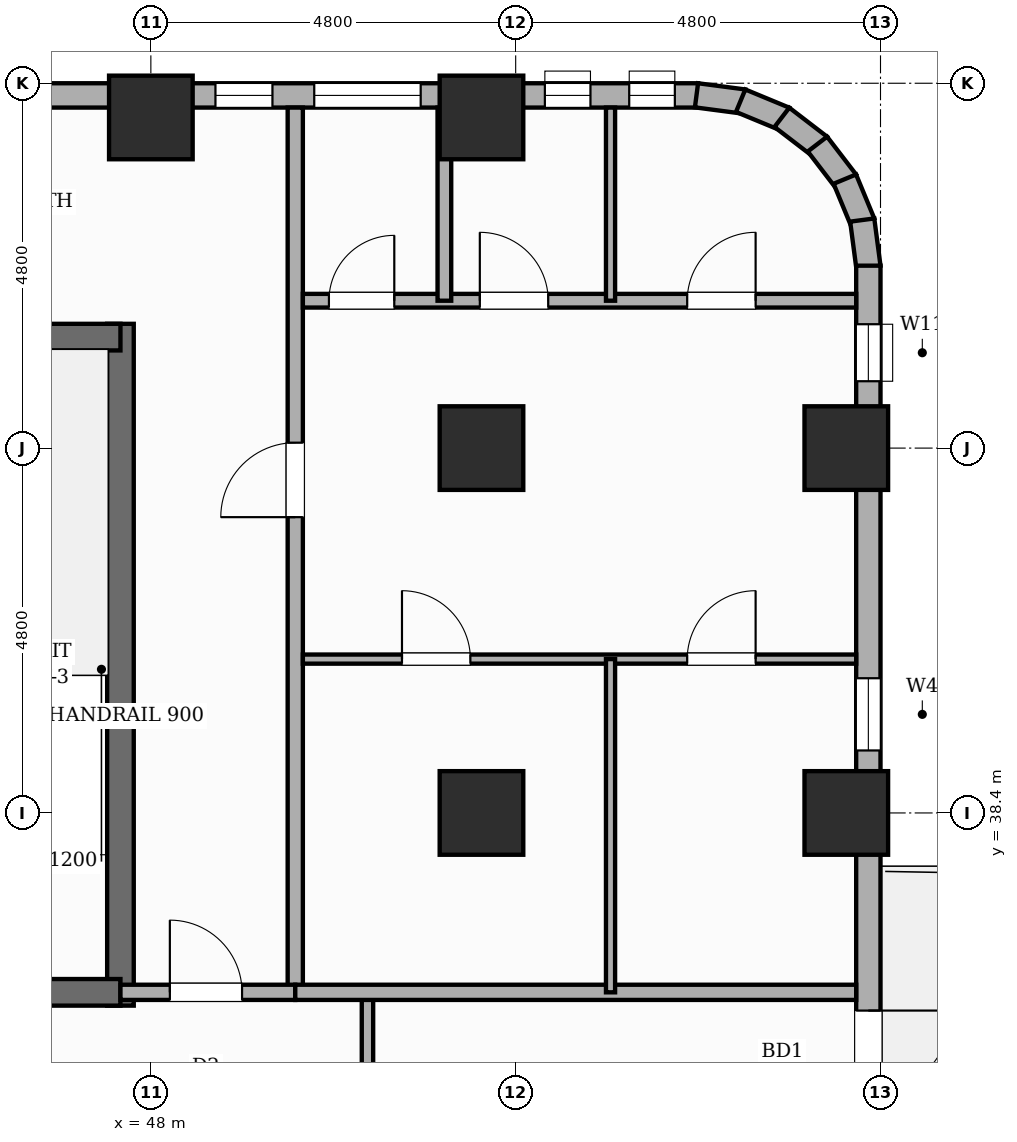
"""IFC4 building model, lengths in metres.
Left out: names, types, materials, properties, quantities, classifications, styles, units other than length and angle.
Written with IfcOpenShell. Run it as: python <this file> out.ifc"""

import sys

from ifc_helpers import new_model, si_unit, direction, frame, frame_2d, origin, origin_2d, place, context, subcontext, project, spatial, rectangle, extrude, element, fill, save


model = new_model("IFC4")
c1 = context("Model", 3, precision=1e-05, world=origin(), true_north=direction((0.0, 1.0)))
c2 = subcontext(c1, "Body", "Model", "MODEL_VIEW")
j1 = project(units=[si_unit("LENGTHUNIT", "METRE"), si_unit("PLANEANGLEUNIT", "RADIAN")], contexts=[c1])
p1 = place(None, origin())
s1 = spatial("IfcSite", under=j1, at=p1, CompositionType="ELEMENT")
p2 = place(p1, origin())
s2 = spatial("IfcBuilding", under=s1, at=p2, CompositionType="ELEMENT")
p3 = place(p2, frame((0.0, 0.0, 28.6)))
s3 = spatial("IfcBuildingStorey", under=s2, at=p3, CompositionType="ELEMENT", Elevation=28.6)
p4 = place(p3, frame((47.6, 35.865, 0.0), z_axis=(0.0, 0.0, 1.0), x_axis=(0.0, 1.0, 0.0)))
e1 = element("IfcWall", 1, at=p4, inside=s3, PredefinedType="SHEAR", context=c2, shape_type="SweptSolid", body=[
    extrude(rectangle(XDim=8.97, YDim=0.35, at=frame_2d((4.485, 0.0))), origin(), (0.0, 0.0, 1.0), 3.6),
])
for number, where, z_axis, x_axis in (
    (2, (44.02, 36.04, 0.0), (0.0, 0.0, 1.0), (1.0, 0.0, 0.0)),
    (3, (44.02, 44.66, 0.0), (0.0, 0.0, 1.0), (1.0, 0.0, 0.0)),
):
    element("IfcWall", number, at=place(p3, frame(where, z_axis=z_axis, x_axis=x_axis)), inside=s3, PredefinedType="SHEAR", context=c2, shape_type="SweptSolid", body=[
        extrude(rectangle(XDim=3.58, YDim=0.35, at=frame_2d((1.79, 0.0))), origin(), (0.0, 0.0, 1.0), 3.6),
    ])
for number, where, z_axis, x_axis in (
    (4, (48.0, 47.55, 0.0), (0.0, 0.0, 1.0), (1.0, 0.0, 0.0)),
    (5, (52.35, 38.4, 0.0), (0.0, 0.0, 1.0), (1.0, 0.0, 0.0)),
    (6, (52.35, 43.2, 0.0), (0.0, 0.0, 1.0), (1.0, 0.0, 0.0)),
    (7, (52.35, 47.55, 0.0), (0.0, 0.0, 1.0), (1.0, 0.0, 0.0)),
    (8, (57.15, 38.4, 0.0), (0.0, 0.0, 1.0), (1.0, 0.0, 0.0)),
    (9, (57.15, 43.2, 0.0), (0.0, 0.0, 1.0), (1.0, 0.0, 0.0)),
):
    element("IfcColumn", number, at=place(p3, frame(where, z_axis=z_axis, x_axis=x_axis)), inside=s3, PredefinedType="COLUMN", context=c2, shape_type="SweptSolid", body=[
        extrude(rectangle(XDim=1.1, YDim=1.1, at=origin_2d()), origin(), (0.0, 0.0, 1.0), 3.6),
    ])
p5 = place(p3, frame((7.2, 47.84, 0.0), z_axis=(0.0, 0.0, 1.0), x_axis=(1.0, 0.0, 0.0)))
e10 = element("IfcWall", 10, at=p5, inside=s3, PredefinedType="STANDARD", context=c2, shape_type="SweptSolid", body=[
    extrude(rectangle(XDim=48.0, YDim=0.32, at=frame_2d((24.0, 0.0))), origin(), (0.0, 0.0, 1.0), 2.53),
])
p6 = place(p5, frame((24.97, 0.0, 0.45)))
e11 = element("IfcOpeningElement", 11, at=p6, cuts=e10, PredefinedType="OPENING", context=c2, shape_type="SweptSolid", body=[
    extrude(rectangle(XDim=0.6, YDim=1.8, at=frame_2d((0.3, 0.9))), frame((0.0, 0.17, 0.0), z_axis=(0.0, -1.0, 0.0), x_axis=(1.0, 0.0, 0.0)), (0.0, 0.0, 1.0), 0.34),
])
p7 = place(p5, frame((32.435, 0.0, 0.65)))
e12 = element("IfcOpeningElement", 12, at=p7, cuts=e10, PredefinedType="OPENING", context=c2, shape_type="SweptSolid", body=[
    extrude(rectangle(XDim=1.4, YDim=1.1, at=frame_2d((0.7, 0.55))), frame((0.0, 0.17, 0.0), z_axis=(0.0, -1.0, 0.0), x_axis=(1.0, 0.0, 0.0)), (0.0, 0.0, 1.0), 0.34),
])
p8 = place(p5, frame((47.094, 0.0, 0.45)))
e13 = element("IfcOpeningElement", 13, at=p8, cuts=e10, PredefinedType="OPENING", context=c2, shape_type="SweptSolid", body=[
    extrude(rectangle(XDim=0.6, YDim=1.8, at=frame_2d((0.3, 0.9))), frame((0.0, 0.17, 0.0), z_axis=(0.0, -1.0, 0.0), x_axis=(1.0, 0.0, 0.0)), (0.0, 0.0, 1.0), 0.34),
])
p9 = place(p5, frame((18.74, 0.0, 0.45)))
e14 = element("IfcOpeningElement", 14, at=p9, cuts=e10, PredefinedType="OPENING", context=c2, shape_type="SweptSolid", body=[
    extrude(rectangle(XDim=0.95, YDim=1.8, at=frame_2d((0.475, 0.9))), frame((0.0, 0.17, 0.0), z_axis=(0.0, -1.0, 0.0), x_axis=(1.0, 0.0, 0.0)), (0.0, 0.0, 1.0), 0.34),
])
p10 = place(p5, frame((41.65, 0.0, 0.45)))
e15 = element("IfcOpeningElement", 15, at=p10, cuts=e10, PredefinedType="OPENING", context=c2, shape_type="SweptSolid", body=[
    extrude(rectangle(XDim=0.75, YDim=1.8, at=frame_2d((0.375, 0.9))), frame((0.0, 0.17, 0.0), z_axis=(0.0, -1.0, 0.0), x_axis=(1.0, 0.0, 0.0)), (0.0, 0.0, 1.0), 0.34),
])
p11 = place(p5, frame((37.736, 0.0, 0.65)))
e16 = element("IfcOpeningElement", 16, at=p11, cuts=e10, PredefinedType="OPENING", context=c2, shape_type="SweptSolid", body=[
    extrude(rectangle(XDim=1.4, YDim=1.1, at=frame_2d((0.7, 0.55))), frame((0.0, 0.17, 0.0), z_axis=(0.0, -1.0, 0.0), x_axis=(1.0, 0.0, 0.0)), (0.0, 0.0, 1.0), 0.34),
])
p12 = place(p5, frame((0.47, 0.0, 0.45)))
e17 = element("IfcOpeningElement", 17, at=p12, cuts=e10, PredefinedType="OPENING", context=c2, shape_type="SweptSolid", body=[
    extrude(rectangle(XDim=0.95, YDim=1.8, at=frame_2d((0.475, 0.9))), frame((0.0, 0.17, 0.0), z_axis=(0.0, -1.0, 0.0), x_axis=(1.0, 0.0, 0.0)), (0.0, 0.0, 1.0), 0.34),
])
p13 = place(p5, frame((4.815, 0.0, 0.65)))
e18 = element("IfcOpeningElement", 18, at=p13, cuts=e10, PredefinedType="OPENING", context=c2, shape_type="SweptSolid", body=[
    extrude(rectangle(XDim=1.4, YDim=1.1, at=frame_2d((0.7, 0.55))), frame((0.0, 0.17, 0.0), z_axis=(0.0, -1.0, 0.0), x_axis=(1.0, 0.0, 0.0)), (0.0, 0.0, 1.0), 0.34),
])
p14 = place(p5, frame((22.87, 0.0, 0.65)))
e19 = element("IfcOpeningElement", 19, at=p14, cuts=e10, PredefinedType="OPENING", context=c2, shape_type="SweptSolid", body=[
    extrude(rectangle(XDim=1.4, YDim=1.1, at=frame_2d((0.7, 0.55))), frame((0.0, 0.17, 0.0), z_axis=(0.0, -1.0, 0.0), x_axis=(1.0, 0.0, 0.0)), (0.0, 0.0, 1.0), 0.34),
])
p15 = place(p5, frame((28.03, 0.0, 0.65)))
e20 = element("IfcOpeningElement", 20, at=p15, cuts=e10, PredefinedType="OPENING", context=c2, shape_type="SweptSolid", body=[
    extrude(rectangle(XDim=1.4, YDim=1.1, at=frame_2d((0.7, 0.55))), frame((0.0, 0.17, 0.0), z_axis=(0.0, -1.0, 0.0), x_axis=(1.0, 0.0, 0.0)), (0.0, 0.0, 1.0), 0.34),
])
p16 = place(p5, frame((42.95, 0.0, 0.65)))
e21 = element("IfcOpeningElement", 21, at=p16, cuts=e10, PredefinedType="OPENING", context=c2, shape_type="SweptSolid", body=[
    extrude(rectangle(XDim=1.4, YDim=1.1, at=frame_2d((0.7, 0.55))), frame((0.0, 0.17, 0.0), z_axis=(0.0, -1.0, 0.0), x_axis=(1.0, 0.0, 0.0)), (0.0, 0.0, 1.0), 0.34),
])
p17 = place(p5, frame((45.984, 0.0, 0.45)))
e22 = element("IfcOpeningElement", 22, at=p17, cuts=e10, PredefinedType="OPENING", context=c2, shape_type="SweptSolid", body=[
    extrude(rectangle(XDim=0.6, YDim=1.8, at=frame_2d((0.3, 0.9))), frame((0.0, 0.17, 0.0), z_axis=(0.0, -1.0, 0.0), x_axis=(1.0, 0.0, 0.0)), (0.0, 0.0, 1.0), 0.34),
])
for number, where, z_axis, x_axis in (
    (23, (55.179, 47.841, 0.0), (0.0, 0.0, 1.0), (0.991, -0.131, 0.0)),
    (24, (55.76, 47.771, 0.0), (0.0, 0.0, 1.0), (0.924, -0.383, 0.0)),
):
    element("IfcWall", number, at=place(p3, frame(where, z_axis=z_axis, x_axis=x_axis)), inside=s3, PredefinedType="STANDARD", context=c2, shape_type="SweptSolid", body=[
        extrude(rectangle(XDim=0.626, YDim=0.32, at=frame_2d((0.313, 0.0))), origin(), (0.0, 0.0, 1.0), 3.35),
    ])
p18 = place(p3, frame((56.302, 47.552, 0.0), z_axis=(0.0, 0.0, 1.0), x_axis=(0.793549926411, -0.608505147302, 0.0)))
e25 = element("IfcWall", 25, at=p18, inside=s3, PredefinedType="STANDARD", context=c2, shape_type="SweptSolid", body=[
    extrude(rectangle(XDim=0.627, YDim=0.32, at=frame_2d((0.313, 0.0))), origin(), (0.0, 0.0, 1.0), 3.35),
])
for number, where, z_axis, x_axis in (
    (26, (56.77, 47.2, 0.0), (0.0, 0.0, 1.0), (0.609, -0.793, 0.0)),
    (27, (57.131, 46.739, 0.0), (0.0, 0.0, 1.0), (0.383, -0.924, 0.0)),
    (28, (57.36, 46.2, 0.0), (0.0, 0.0, 1.0), (0.131, -0.991, 0.0)),
):
    element("IfcWall", number, at=place(p3, frame(where, z_axis=z_axis, x_axis=x_axis)), inside=s3, PredefinedType="STANDARD", context=c2, shape_type="SweptSolid", body=[
        extrude(rectangle(XDim=0.626, YDim=0.32, at=frame_2d((0.313, 0.0))), origin(), (0.0, 0.0, 1.0), 3.35),
    ])
p19 = place(p3, frame((57.44, 45.6, 0.0), z_axis=(0.0, 0.0, 1.0), x_axis=(0.0, -1.0, 0.0)))
e29 = element("IfcWall", 29, at=p19, inside=s3, PredefinedType="STANDARD", context=c2, shape_type="SweptSolid", body=[
    extrude(rectangle(XDim=14.4, YDim=0.32, at=frame_2d((7.2, 0.0))), origin(), (0.0, 0.0, 1.0), 2.53),
])
p20 = place(p19, frame((9.8, 0.0, 0.0)))
e30 = element("IfcOpeningElement", 30, at=p20, cuts=e29, PredefinedType="OPENING", context=c2, shape_type="SweptSolid", body=[
    extrude(rectangle(XDim=1.1, YDim=2.15, at=frame_2d((0.55, 1.075))), frame((0.0, 0.17, 0.0), z_axis=(0.0, -1.0, 0.0), x_axis=(1.0, 0.0, 0.0)), (0.0, 0.0, 1.0), 0.34),
])
p21 = place(p19, frame((5.428, 0.0, 0.45)))
e31 = element("IfcOpeningElement", 31, at=p21, cuts=e29, PredefinedType="OPENING", context=c2, shape_type="SweptSolid", body=[
    extrude(rectangle(XDim=0.95, YDim=1.8, at=frame_2d((0.475, 0.9))), frame((0.0, 0.17, 0.0), z_axis=(0.0, -1.0, 0.0), x_axis=(1.0, 0.0, 0.0)), (0.0, 0.0, 1.0), 0.34),
])
p22 = place(p19, frame((12.98, 0.0, 0.45)))
e32 = element("IfcOpeningElement", 32, at=p22, cuts=e29, PredefinedType="OPENING", context=c2, shape_type="SweptSolid", body=[
    extrude(rectangle(XDim=0.95, YDim=1.8, at=frame_2d((0.475, 0.9))), frame((0.0, 0.17, 0.0), z_axis=(0.0, -1.0, 0.0), x_axis=(1.0, 0.0, 0.0)), (0.0, 0.0, 1.0), 0.34),
])
p23 = place(p19, frame((0.771, 0.0, 0.45)))
e33 = element("IfcOpeningElement", 33, at=p23, cuts=e29, PredefinedType="OPENING", context=c2, shape_type="SweptSolid", body=[
    extrude(rectangle(XDim=0.75, YDim=1.8, at=frame_2d((0.375, 0.9))), frame((0.0, 0.17, 0.0), z_axis=(0.0, -1.0, 0.0), x_axis=(1.0, 0.0, 0.0)), (0.0, 0.0, 1.0), 0.34),
])
p24 = place(p3, frame((49.9, 36.04, 0.0), z_axis=(0.0, 0.0, 1.0), x_axis=(0.0, 1.0, 0.0)))
e34 = element("IfcWall", 34, at=p24, inside=s3, PredefinedType="PARTITIONING", context=c2, shape_type="SweptSolid", body=[
    extrude(rectangle(XDim=11.64, YDim=0.2, at=frame_2d((5.82, 0.0))), origin(), (0.0, 0.0, 1.0), 3.35),
])
p25 = place(p24, frame((6.251, 0.0, 0.0)))
e35 = element("IfcOpeningElement", 35, at=p25, cuts=e34, PredefinedType="OPENING", context=c2, shape_type="SweptSolid", body=[
    extrude(rectangle(XDim=0.98, YDim=2.18, at=frame_2d((0.49, 1.09))), frame((0.0, 0.11, 0.0), z_axis=(0.0, -1.0, 0.0), x_axis=(1.0, 0.0, 0.0)), (0.0, 0.0, 1.0), 0.22),
])
p26 = place(p3, frame((47.6, 36.04, 0.0), z_axis=(0.0, 0.0, 1.0), x_axis=(1.0, 0.0, 0.0)))
e36 = element("IfcWall", 36, at=p26, inside=s3, PredefinedType="PARTITIONING", context=c2, shape_type="SweptSolid", body=[
    extrude(rectangle(XDim=2.3, YDim=0.2, at=frame_2d((1.15, 0.0))), origin(), (0.0, 0.0, 1.0), 3.35),
])
p27 = place(p26, frame((0.65, 0.0, 0.0)))
e37 = element("IfcOpeningElement", 37, at=p27, cuts=e36, PredefinedType="OPENING", context=c2, shape_type="SweptSolid", body=[
    extrude(rectangle(XDim=0.95, YDim=2.15, at=frame_2d((0.475, 1.075))), frame((0.0, 0.11, 0.0), z_axis=(0.0, -1.0, 0.0), x_axis=(1.0, 0.0, 0.0)), (0.0, 0.0, 1.0), 0.22),
])
p28 = place(p3, frame((50.85, 29.12, 0.0), z_axis=(0.0, 0.0, 1.0), x_axis=(0.0, 1.0, 0.0)))
e38 = element("IfcWall", 38, at=p28, inside=s3, PredefinedType="PARTITIONING", context=c2, shape_type="SweptSolid", body=[
    extrude(rectangle(XDim=6.92, YDim=0.15, at=frame_2d((3.46, 0.0))), origin(), (0.0, 0.0, 1.0), 3.35),
])
p29 = place(p28, frame((2.24, 0.0, 0.0)))
e39 = element("IfcOpeningElement", 39, at=p29, cuts=e38, PredefinedType="OPENING", context=c2, shape_type="SweptSolid", body=[
    extrude(rectangle(XDim=0.9, YDim=2.15, at=frame_2d((0.45, 1.075))), frame((0.0, 0.085, 0.0), z_axis=(0.0, -1.0, 0.0), x_axis=(1.0, 0.0, 0.0)), (0.0, 0.0, 1.0), 0.17),
])
p30 = place(p3, frame((49.9, 36.04, 0.0), z_axis=(0.0, 0.0, 1.0), x_axis=(1.0, 0.0, 0.0)))
e40 = element("IfcWall", 40, at=p30, inside=s3, PredefinedType="SOLIDWALL", context=c2, shape_type="SweptSolid", body=[
    extrude(rectangle(XDim=7.38, YDim=0.2, at=frame_2d((3.69, 0.0))), origin(), (0.0, 0.0, 1.0), 3.35),
])
p31 = place(p3, frame((50.0, 45.139, 0.0), z_axis=(0.0, 0.0, 1.0), x_axis=(1.0, 0.0, 0.0)))
e41 = element("IfcWall", 41, at=p31, inside=s3, PredefinedType="PLUMBINGWALL", context=c2, shape_type="SweptSolid", body=[
    extrude(rectangle(XDim=7.28, YDim=0.18, at=frame_2d((3.64, 0.0))), origin(), (0.0, 0.0, 1.0), 3.35),
])
p32 = place(p31, frame((0.343, 0.0, 0.0)))
e42 = element("IfcOpeningElement", 42, at=p32, cuts=e41, PredefinedType="OPENING", context=c2, shape_type="SweptSolid", body=[
    extrude(rectangle(XDim=0.86, YDim=2.1, at=frame_2d((0.43, 1.05))), frame((0.0, 0.1, 0.0), z_axis=(0.0, -1.0, 0.0), x_axis=(1.0, 0.0, 0.0)), (0.0, 0.0, 1.0), 0.2),
])
p33 = place(p31, frame((2.328, 0.0, 0.0)))
e43 = element("IfcOpeningElement", 43, at=p33, cuts=e41, PredefinedType="OPENING", context=c2, shape_type="SweptSolid", body=[
    extrude(rectangle(XDim=0.9, YDim=2.15, at=frame_2d((0.45, 1.075))), frame((0.0, 0.1, 0.0), z_axis=(0.0, -1.0, 0.0), x_axis=(1.0, 0.0, 0.0)), (0.0, 0.0, 1.0), 0.2),
])
p34 = place(p31, frame((5.057, 0.0, 0.0)))
e44 = element("IfcOpeningElement", 44, at=p34, cuts=e41, PredefinedType="OPENING", context=c2, shape_type="SweptSolid", body=[
    extrude(rectangle(XDim=0.9, YDim=2.15, at=frame_2d((0.45, 1.075))), frame((0.0, 0.1, 0.0), z_axis=(0.0, -1.0, 0.0), x_axis=(1.0, 0.0, 0.0)), (0.0, 0.0, 1.0), 0.2),
])
p35 = place(p3, frame((50.0, 40.424, 0.0), z_axis=(0.0, 0.0, 1.0), x_axis=(1.0, 0.0, 0.0)))
e45 = element("IfcWall", 45, at=p35, inside=s3, PredefinedType="PARTITIONING", context=c2, shape_type="SweptSolid", body=[
    extrude(rectangle(XDim=7.28, YDim=0.12, at=frame_2d((3.64, 0.0))), origin(), (0.0, 0.0, 1.0), 3.35),
])
p36 = place(p35, frame((1.304, 0.0, 0.0)))
e46 = element("IfcOpeningElement", 46, at=p36, cuts=e45, PredefinedType="OPENING", context=c2, shape_type="SweptSolid", body=[
    extrude(rectangle(XDim=0.9, YDim=2.15, at=frame_2d((0.45, 1.075))), frame((0.0, 0.07, 0.0), z_axis=(0.0, -1.0, 0.0), x_axis=(1.0, 0.0, 0.0)), (0.0, 0.0, 1.0), 0.14),
])
p37 = place(p35, frame((5.057, 0.0, 0.0)))
e47 = element("IfcOpeningElement", 47, at=p37, cuts=e45, PredefinedType="OPENING", context=c2, shape_type="SweptSolid", body=[
    extrude(rectangle(XDim=0.9, YDim=2.15, at=frame_2d((0.45, 1.075))), frame((0.0, 0.07, 0.0), z_axis=(0.0, -1.0, 0.0), x_axis=(1.0, 0.0, 0.0)), (0.0, 0.0, 1.0), 0.14),
])
p38 = place(p3, frame((54.048, 36.04, 0.0), z_axis=(0.0, 0.0, 1.0), x_axis=(0.0, 1.0, 0.0)))
e48 = element("IfcWall", 48, at=p38, inside=s3, PredefinedType="PARTITIONING", context=c2, shape_type="SweptSolid", body=[
    extrude(rectangle(XDim=4.384, YDim=0.12, at=frame_2d((2.192, 0.0))), origin(), (0.0, 0.0, 1.0), 3.35),
])
p39 = place(p3, frame((51.862, 45.139, 0.0), z_axis=(0.0, 0.0, 1.0), x_axis=(0.0, 1.0, 0.0)))
e49 = element("IfcWall", 49, at=p39, inside=s3, PredefinedType="PLUMBINGWALL", context=c2, shape_type="SweptSolid", body=[
    extrude(rectangle(XDim=2.541, YDim=0.18, at=frame_2d((1.271, 0.0))), origin(), (0.0, 0.0, 1.0), 3.35),
])
p40 = place(p3, frame((54.048, 45.139, 0.0), z_axis=(0.0, 0.0, 1.0), x_axis=(0.0, 1.0, 0.0)))
e50 = element("IfcWall", 50, at=p40, inside=s3, PredefinedType="PARTITIONING", context=c2, shape_type="SweptSolid", body=[
    extrude(rectangle(XDim=2.541, YDim=0.12, at=frame_2d((1.271, 0.0))), origin(), (0.0, 0.0, 1.0), 3.35),
])
p41 = place(p8, origin())
e51 = element("IfcWindow", 51, at=p41, inside=s3, PartitioningType="SINGLE_PANEL", PredefinedType="WINDOW", context=c2, shape_type="SweptSolid", body=[
    extrude(rectangle(XDim=0.6, YDim=1.8, at=frame_2d((0.3, 0.9))), frame((0.0, 0.03, 0.0), z_axis=(0.0, -1.0, 0.0), x_axis=(1.0, 0.0, 0.0)), (0.0, 0.0, 1.0), 0.06),
])
fill(e13, e51)
p42 = place(p10, origin())
e52 = element("IfcWindow", 52, at=p42, inside=s3, PartitioningType="SINGLE_PANEL", PredefinedType="WINDOW", context=c2, shape_type="SweptSolid", body=[
    extrude(rectangle(XDim=0.75, YDim=1.8, at=frame_2d((0.375, 0.9))), frame((0.0, 0.03, 0.0), z_axis=(0.0, -1.0, 0.0), x_axis=(1.0, 0.0, 0.0)), (0.0, 0.0, 1.0), 0.06),
])
fill(e15, e52)
p43 = place(p16, origin())
e53 = element("IfcWindow", 53, at=p43, inside=s3, PartitioningType="SINGLE_PANEL", PredefinedType="WINDOW", context=c2, shape_type="SweptSolid", body=[
    extrude(rectangle(XDim=1.4, YDim=1.1, at=frame_2d((0.7, 0.55))), frame((0.0, 0.03, 0.0), z_axis=(0.0, -1.0, 0.0), x_axis=(1.0, 0.0, 0.0)), (0.0, 0.0, 1.0), 0.06),
])
fill(e21, e53)
p44 = place(p17, origin())
e54 = element("IfcWindow", 54, at=p44, inside=s3, PartitioningType="SINGLE_PANEL", PredefinedType="WINDOW", context=c2, shape_type="SweptSolid", body=[
    extrude(rectangle(XDim=0.6, YDim=1.8, at=frame_2d((0.3, 0.9))), frame((0.0, 0.03, 0.0), z_axis=(0.0, -1.0, 0.0), x_axis=(1.0, 0.0, 0.0)), (0.0, 0.0, 1.0), 0.06),
])
fill(e22, e54)
p45 = place(p20, origin())
e55 = element("IfcDoor", 55, at=p45, inside=s3, OperationType="SINGLE_SWING_LEFT", PredefinedType="DOOR", context=c2, shape_type="SweptSolid", body=[
    extrude(rectangle(XDim=1.1, YDim=2.15, at=frame_2d((0.55, 1.075))), frame((0.0, 0.025, 0.0), z_axis=(0.0, -1.0, 0.0), x_axis=(1.0, 0.0, 0.0)), (0.0, 0.0, 1.0), 0.05),
])
fill(e30, e55)
p46 = place(p21, origin())
e56 = element("IfcWindow", 56, at=p46, inside=s3, PartitioningType="SINGLE_PANEL", PredefinedType="WINDOW", context=c2, shape_type="SweptSolid", body=[
    extrude(rectangle(XDim=0.95, YDim=1.8, at=frame_2d((0.475, 0.9))), frame((0.0, 0.03, 0.0), z_axis=(0.0, -1.0, 0.0), x_axis=(1.0, 0.0, 0.0)), (0.0, 0.0, 1.0), 0.06),
])
fill(e31, e56)
p47 = place(p23, origin())
e57 = element("IfcWindow", 57, at=p47, inside=s3, PartitioningType="SINGLE_PANEL", PredefinedType="WINDOW", context=c2, shape_type="SweptSolid", body=[
    extrude(rectangle(XDim=0.75, YDim=1.8, at=frame_2d((0.375, 0.9))), frame((0.0, 0.03, 0.0), z_axis=(0.0, -1.0, 0.0), x_axis=(1.0, 0.0, 0.0)), (0.0, 0.0, 1.0), 0.06),
])
fill(e33, e57)
p48 = place(p27, origin())
e58 = element("IfcDoor", 58, at=p48, inside=s3, OperationType="SINGLE_SWING_LEFT", PredefinedType="DOOR", context=c2, shape_type="SweptSolid", body=[
    extrude(rectangle(XDim=0.95, YDim=2.15, at=frame_2d((0.475, 1.075))), frame((0.0, 0.025, 0.0), z_axis=(0.0, -1.0, 0.0), x_axis=(1.0, 0.0, 0.0)), (0.0, 0.0, 1.0), 0.05),
])
fill(e37, e58)
p49 = place(p25, origin())
e59 = element("IfcDoor", 59, at=p49, inside=s3, OperationType="SINGLE_SWING_LEFT", PredefinedType="DOOR", context=c2, shape_type="SweptSolid", body=[
    extrude(rectangle(XDim=0.98, YDim=2.18, at=frame_2d((0.49, 1.09))), frame((0.0, 0.025, 0.0), z_axis=(0.0, -1.0, 0.0), x_axis=(1.0, 0.0, 0.0)), (0.0, 0.0, 1.0), 0.05),
])
fill(e35, e59)
p50 = place(p36, origin())
e60 = element("IfcDoor", 60, at=p50, inside=s3, OperationType="SINGLE_SWING_LEFT", PredefinedType="DOOR", context=c2, shape_type="SweptSolid", body=[
    extrude(rectangle(XDim=0.9, YDim=2.15, at=frame_2d((0.45, 1.075))), frame((0.0, 0.025, 0.0), z_axis=(0.0, -1.0, 0.0), x_axis=(1.0, 0.0, 0.0)), (0.0, 0.0, 1.0), 0.05),
])
fill(e46, e60)
p51 = place(p37, origin())
e61 = element("IfcDoor", 61, at=p51, inside=s3, OperationType="SINGLE_SWING_RIGHT", PredefinedType="DOOR", context=c2, shape_type="SweptSolid", body=[
    extrude(rectangle(XDim=0.9, YDim=2.15, at=frame_2d((0.45, 1.075))), frame((0.0, 0.025, 0.0), z_axis=(0.0, -1.0, 0.0), x_axis=(1.0, 0.0, 0.0)), (0.0, 0.0, 1.0), 0.05),
])
fill(e47, e61)
p52 = place(p32, origin())
e62 = element("IfcDoor", 62, at=p52, inside=s3, OperationType="SINGLE_SWING_RIGHT", PredefinedType="DOOR", context=c2, shape_type="SweptSolid", body=[
    extrude(rectangle(XDim=0.86, YDim=2.1, at=frame_2d((0.43, 1.05))), frame((0.0, 0.025, 0.0), z_axis=(0.0, -1.0, 0.0), x_axis=(1.0, 0.0, 0.0)), (0.0, 0.0, 1.0), 0.05),
])
fill(e42, e62)
p53 = place(p33, origin())
e63 = element("IfcDoor", 63, at=p53, inside=s3, OperationType="SINGLE_SWING_LEFT", PredefinedType="DOOR", context=c2, shape_type="SweptSolid", body=[
    extrude(rectangle(XDim=0.9, YDim=2.15, at=frame_2d((0.45, 1.075))), frame((0.0, 0.025, 0.0), z_axis=(0.0, -1.0, 0.0), x_axis=(1.0, 0.0, 0.0)), (0.0, 0.0, 1.0), 0.05),
])
fill(e43, e63)
p54 = place(p34, origin())
e64 = element("IfcDoor", 64, at=p54, inside=s3, OperationType="SINGLE_SWING_RIGHT", PredefinedType="DOOR", context=c2, shape_type="SweptSolid", body=[
    extrude(rectangle(XDim=0.9, YDim=2.15, at=frame_2d((0.45, 1.075))), frame((0.0, 0.025, 0.0), z_axis=(0.0, -1.0, 0.0), x_axis=(1.0, 0.0, 0.0)), (0.0, 0.0, 1.0), 0.05),
])
fill(e44, e64)
save(model, sys.argv[1])
